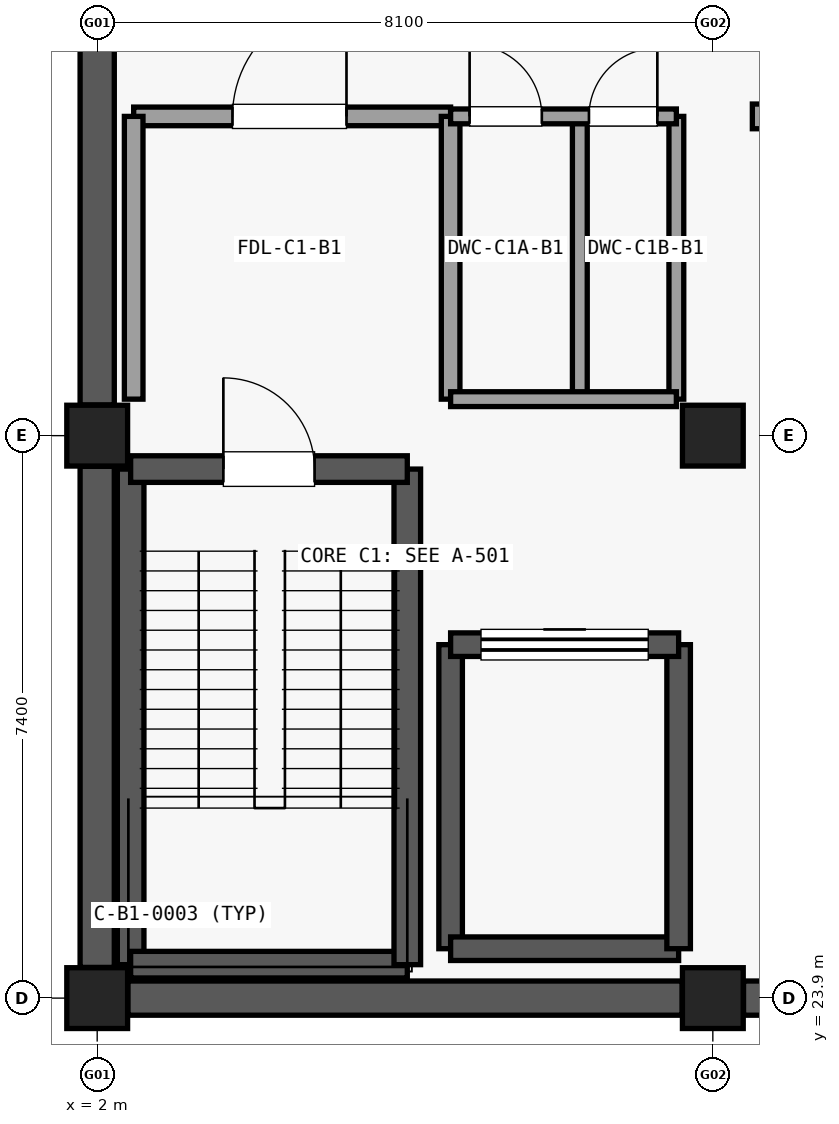
"""IFC4 building model, lengths in metres.
Left out: names, types, materials, properties, quantities, classifications, styles, units other than length and angle.
Written with IfcOpenShell. Run it as: python <this file> out.ifc"""

import sys

from ifc_helpers import new_model, si_unit, direction, frame, frame_2d, origin, origin_2d, place, context, subcontext, project, spatial, rectangle, extrude, element, fill, save


model = new_model("IFC4")
c1 = context("Model", 3, precision=1e-05, world=origin(), true_north=direction((0.0, 1.0)))
c2 = subcontext(c1, "Body", "Model", "MODEL_VIEW")
j1 = project(units=[si_unit("LENGTHUNIT", "METRE"), si_unit("PLANEANGLEUNIT", "RADIAN")], contexts=[c1])
p1 = place(None, origin())
s1 = spatial("IfcSite", under=j1, at=p1, CompositionType="ELEMENT")
p2 = place(p1, origin())
s2 = spatial("IfcBuilding", under=s1, at=p2, CompositionType="ELEMENT")
p3 = place(p2, frame((0.0, 0.0, -4.8)))
s3 = spatial("IfcBuildingStorey", under=s2, at=p3, CompositionType="ELEMENT", Elevation=-4.8)
for number, where, z_axis, x_axis in (
    (1, (2.0, 23.9, 0.0), (0.0, 0.0, 1.0), (1.0, 0.0, 0.0)),
    (2, (2.0, 31.3, 0.0), (0.0, 0.0, 1.0), (1.0, 0.0, 0.0)),
    (3, (10.1, 23.9, 0.0), (0.0, 0.0, 1.0), (1.0, 0.0, 0.0)),
    (4, (10.1, 31.3, 0.0), (0.0, 0.0, 1.0), (1.0, 0.0, 0.0)),
):
    element("IfcColumn", number, at=place(p3, frame(where, z_axis=z_axis, x_axis=x_axis)), inside=s3, PredefinedType="COLUMN", context=c2, shape_type="SweptSolid", body=[
        extrude(rectangle(XDim=0.8, YDim=0.8, at=origin_2d()), origin(), (0.0, 0.0, 1.0), 4.52),
    ])
p4 = place(p3, frame((9.696, 23.9, 0.0), z_axis=(0.0, 0.0, 1.0), x_axis=(-1.0, 0.0, 0.0)))
e5 = element("IfcWall", 5, at=p4, inside=s3, PredefinedType="USERDEFINED", context=c2, shape_type="SweptSolid", body=[
    extrude(rectangle(XDim=7.292, YDim=0.45, at=frame_2d((3.646, 0.0))), origin(), (0.0, 0.0, 1.0), 2.95),
])
p5 = place(p3, frame((2.0, 24.304, 0.0), z_axis=(0.0, 0.0, 1.0), x_axis=(0.0, 1.0, 0.0)))
e6 = element("IfcWall", 6, at=p5, inside=s3, PredefinedType="USERDEFINED", context=c2, shape_type="SweptSolid", body=[
    extrude(rectangle(XDim=6.592, YDim=0.45, at=frame_2d((3.296, 0.0))), origin(), (0.0, 0.0, 1.0), 2.95),
])
p6 = place(p3, frame((2.0, 31.704, 0.0), z_axis=(0.0, 0.0, 1.0), x_axis=(0.0, 1.0, 0.0)))
e7 = element("IfcWall", 7, at=p6, inside=s3, PredefinedType="USERDEFINED", context=c2, shape_type="SweptSolid", body=[
    extrude(rectangle(XDim=6.592, YDim=0.45, at=frame_2d((3.296, 0.0))), origin(), (0.0, 0.0, 1.0), 2.95),
])
p7 = place(p3, frame((17.796, 23.9, 0.0), z_axis=(0.0, 0.0, 1.0), x_axis=(-1.0, 0.0, 0.0)))
e8 = element("IfcWall", 8, at=p7, inside=s3, PredefinedType="USERDEFINED", context=c2, shape_type="SweptSolid", body=[
    extrude(rectangle(XDim=7.292, YDim=0.45, at=frame_2d((3.646, 0.0))), origin(), (0.0, 0.0, 1.0), 2.95),
])
p8 = place(p3, frame((2.44, 24.34, 0.0), z_axis=(0.0, 0.0, 1.0), x_axis=(0.0, 1.0, 0.0)))
e9 = element("IfcWall", 9, at=p8, inside=s3, PredefinedType="SHEAR", context=c2, shape_type="SweptSolid", body=[
    extrude(rectangle(XDim=6.52, YDim=0.35, at=frame_2d((3.26, 0.0))), origin(), (0.0, 0.0, 1.0), 4.515),
])
p9 = place(p3, frame((2.44, 24.34, 0.0), z_axis=(0.0, 0.0, 1.0), x_axis=(1.0, 0.0, 0.0)))
e10 = element("IfcWall", 10, at=p9, inside=s3, PredefinedType="SHEAR", context=c2, shape_type="SweptSolid", body=[
    extrude(rectangle(XDim=3.64, YDim=0.35, at=frame_2d((1.82, 0.0))), origin(), (0.0, 0.0, 1.0), 4.515),
])
p10 = place(p3, frame((6.08, 24.34, 0.0), z_axis=(0.0, 0.0, 1.0), x_axis=(0.0, 1.0, 0.0)))
e11 = element("IfcWall", 11, at=p10, inside=s3, PredefinedType="SHEAR", context=c2, shape_type="SweptSolid", body=[
    extrude(rectangle(XDim=6.52, YDim=0.35, at=frame_2d((3.26, 0.0))), origin(), (0.0, 0.0, 1.0), 4.515),
])
p11 = place(p3, frame((2.44, 30.86, 0.0), z_axis=(0.0, 0.0, 1.0), x_axis=(1.0, 0.0, 0.0)))
e12 = element("IfcWall", 12, at=p11, inside=s3, PredefinedType="SHEAR", context=c2, shape_type="SweptSolid", body=[
    extrude(rectangle(XDim=3.64, YDim=0.35, at=frame_2d((1.82, 0.0))), origin(), (0.0, 0.0, 1.0), 4.515),
])
p12 = place(p11, frame((1.22, 0.0, 0.0)))
e13 = element("IfcOpeningElement", 13, at=p12, cuts=e12, PredefinedType="OPENING", context=c2, shape_type="SweptSolid", body=[
    extrude(rectangle(XDim=1.2, YDim=2.15, at=frame_2d((0.6, 1.075))), frame((0.0, 0.185, 0.0), z_axis=(0.0, -1.0, 0.0), x_axis=(1.0, 0.0, 0.0)), (0.0, 0.0, 1.0), 0.37),
])
p13 = place(p3, frame((6.65, 24.55, 0.0), z_axis=(0.0, 0.0, 1.0), x_axis=(0.0, 1.0, 0.0)))
e14 = element("IfcWall", 14, at=p13, inside=s3, PredefinedType="SHEAR", context=c2, shape_type="SweptSolid", body=[
    extrude(rectangle(XDim=4.0, YDim=0.31, at=frame_2d((2.0, 0.0))), origin(), (0.0, 0.0, 1.0), 4.515),
])
p14 = place(p3, frame((6.65, 24.55, 0.0), z_axis=(0.0, 0.0, 1.0), x_axis=(1.0, 0.0, 0.0)))
e15 = element("IfcWall", 15, at=p14, inside=s3, PredefinedType="SHEAR", context=c2, shape_type="SweptSolid", body=[
    extrude(rectangle(XDim=3.0, YDim=0.31, at=frame_2d((1.5, 0.0))), origin(), (0.0, 0.0, 1.0), 4.515),
])
p15 = place(p3, frame((9.65, 24.55, 0.0), z_axis=(0.0, 0.0, 1.0), x_axis=(0.0, 1.0, 0.0)))
e16 = element("IfcWall", 16, at=p15, inside=s3, PredefinedType="SHEAR", context=c2, shape_type="SweptSolid", body=[
    extrude(rectangle(XDim=4.0, YDim=0.31, at=frame_2d((2.0, 0.0))), origin(), (0.0, 0.0, 1.0), 4.515),
])
p16 = place(p3, frame((6.65, 28.55, 0.0), z_axis=(0.0, 0.0, 1.0), x_axis=(1.0, 0.0, 0.0)))
e17 = element("IfcWall", 17, at=p16, inside=s3, PredefinedType="SHEAR", context=c2, shape_type="SweptSolid", body=[
    extrude(rectangle(XDim=3.0, YDim=0.31, at=frame_2d((1.5, 0.0))), origin(), (0.0, 0.0, 1.0), 4.515),
])
p17 = place(p16, frame((0.4, 0.0, 0.0)))
e18 = element("IfcOpeningElement", 18, at=p17, cuts=e17, PredefinedType="OPENING", context=c2, shape_type="SweptSolid", body=[
    extrude(rectangle(XDim=2.2, YDim=2.55, at=frame_2d((1.1, 1.275))), frame((0.0, 0.165, 0.0), z_axis=(0.0, -1.0, 0.0), x_axis=(1.0, 0.0, 0.0)), (0.0, 0.0, 1.0), 0.33),
])
p18 = place(p3, frame((2.48, 35.5, 0.0), z_axis=(0.0, 0.0, 1.0), x_axis=(1.0, 0.0, 0.0)))
e19 = element("IfcWall", 19, at=p18, inside=s3, PredefinedType="PARTITIONING", context=c2, shape_type="SweptSolid", body=[
    extrude(rectangle(XDim=4.17, YDim=0.245, at=frame_2d((2.085, 0.0))), origin(), (0.0, 0.0, 1.0), 3.66),
])
p19 = place(p18, frame((1.3, 0.0, 0.0)))
e20 = element("IfcOpeningElement", 20, at=p19, cuts=e19, PredefinedType="OPENING", context=c2, shape_type="SweptSolid", body=[
    extrude(rectangle(XDim=1.5, YDim=2.15, at=frame_2d((0.75, 1.075))), frame((0.0, 0.133, 0.0), z_axis=(0.0, -1.0, 0.0), x_axis=(1.0, 0.0, 0.0)), (0.0, 0.0, 1.0), 0.265),
])
for number, where, z_axis, x_axis in (
    (21, (2.48, 31.78, 0.0), (0.0, 0.0, 1.0), (0.0, 1.0, 0.0)),
    (22, (6.65, 31.78, 0.0), (0.0, 0.0, 1.0), (0.0, 1.0, 0.0)),
):
    element("IfcWall", number, at=place(p3, frame(where, z_axis=z_axis, x_axis=x_axis)), inside=s3, PredefinedType="PARTITIONING", context=c2, shape_type="SweptSolid", body=[
        extrude(rectangle(XDim=3.72, YDim=0.245, at=frame_2d((1.86, 0.0))), origin(), (0.0, 0.0, 1.0), 3.66),
    ])
for number, where, z_axis, x_axis in (
    (23, (8.35, 31.78, 0.0), (0.0, 0.0, 1.0), (0.0, 1.0, 0.0)),
    (24, (9.62, 31.78, 0.0), (0.0, 0.0, 1.0), (0.0, 1.0, 0.0)),
):
    element("IfcWall", number, at=place(p3, frame(where, z_axis=z_axis, x_axis=x_axis)), inside=s3, PredefinedType="PARTITIONING", context=c2, shape_type="SweptSolid", body=[
        extrude(rectangle(XDim=3.72, YDim=0.195, at=frame_2d((1.86, 0.0))), origin(), (0.0, 0.0, 1.0), 3.66),
    ])
p20 = place(p3, frame((6.65, 31.78, 0.0), z_axis=(0.0, 0.0, 1.0), x_axis=(1.0, 0.0, 0.0)))
e25 = element("IfcWall", 25, at=p20, inside=s3, PredefinedType="PARTITIONING", context=c2, shape_type="SweptSolid", body=[
    extrude(rectangle(XDim=2.97, YDim=0.195, at=frame_2d((1.485, 0.0))), origin(), (0.0, 0.0, 1.0), 3.66),
])
p21 = place(p3, frame((6.65, 35.5, 0.0), z_axis=(0.0, 0.0, 1.0), x_axis=(1.0, 0.0, 0.0)))
e26 = element("IfcWall", 26, at=p21, inside=s3, PredefinedType="PARTITIONING", context=c2, shape_type="SweptSolid", body=[
    extrude(rectangle(XDim=2.97, YDim=0.195, at=frame_2d((1.485, 0.0))), origin(), (0.0, 0.0, 1.0), 3.66),
])
p22 = place(p21, frame((0.25, 0.0, 0.0)))
e27 = element("IfcOpeningElement", 27, at=p22, cuts=e26, PredefinedType="OPENING", context=c2, shape_type="SweptSolid", body=[
    extrude(rectangle(XDim=0.95, YDim=2.1, at=frame_2d((0.475, 1.05))), frame((0.0, 0.107, 0.0), z_axis=(0.0, -1.0, 0.0), x_axis=(1.0, 0.0, 0.0)), (0.0, 0.0, 1.0), 0.215),
])
p23 = place(p21, frame((1.82, 0.0, 0.0)))
e28 = element("IfcOpeningElement", 28, at=p23, cuts=e26, PredefinedType="OPENING", context=c2, shape_type="SweptSolid", body=[
    extrude(rectangle(XDim=0.9, YDim=2.1, at=frame_2d((0.45, 1.05))), frame((0.0, 0.107, 0.0), z_axis=(0.0, -1.0, 0.0), x_axis=(1.0, 0.0, 0.0)), (0.0, 0.0, 1.0), 0.215),
])
p24 = place(p3, frame((10.62, 35.5, 0.0), z_axis=(0.0, 0.0, 1.0), x_axis=(1.0, 0.0, 0.0)))
e29 = element("IfcWall", 29, at=p24, inside=s3, PredefinedType="SHEAR", context=c2, shape_type="SweptSolid", body=[
    extrude(rectangle(XDim=7.06, YDim=0.325, at=frame_2d((3.53, 0.0))), origin(), (0.0, 0.0, 1.0), 3.66),
])
p25 = place(p24, frame((2.43, 0.0, 0.0)))
e30 = element("IfcOpeningElement", 30, at=p25, cuts=e29, PredefinedType="OPENING", context=c2, shape_type="SweptSolid", body=[
    extrude(rectangle(XDim=2.2, YDim=2.65, at=frame_2d((1.1, 1.325))), frame((0.0, 0.172, 0.0), z_axis=(0.0, -1.0, 0.0), x_axis=(1.0, 0.0, 0.0)), (0.0, 0.0, 1.0), 0.345),
])
p26 = place(p12, origin())
e31 = element("IfcDoor", 31, at=p26, inside=s3, OperationType="SINGLE_SWING_LEFT", PredefinedType="DOOR", context=c2, shape_type="SweptSolid", body=[
    extrude(rectangle(XDim=1.2, YDim=2.15, at=frame_2d((0.6, 1.075))), frame((0.0, 0.025, 0.0), z_axis=(0.0, -1.0, 0.0), x_axis=(1.0, 0.0, 0.0)), (0.0, 0.0, 1.0), 0.05),
])
fill(e13, e31)
p27 = place(p17, origin())
e32 = element("IfcDoor", 32, at=p27, inside=s3, OperationType="SLIDING_TO_LEFT", PredefinedType="DOOR", context=c2, shape_type="SweptSolid", body=[
    extrude(rectangle(XDim=2.2, YDim=2.55, at=frame_2d((1.1, 1.275))), frame((0.0, 0.025, 0.0), z_axis=(0.0, -1.0, 0.0), x_axis=(1.0, 0.0, 0.0)), (0.0, 0.0, 1.0), 0.05),
])
fill(e18, e32)
p28 = place(p19, origin())
e33 = element("IfcDoor", 33, at=p28, inside=s3, OperationType="SINGLE_SWING_RIGHT", PredefinedType="DOOR", context=c2, shape_type="SweptSolid", body=[
    extrude(rectangle(XDim=1.5, YDim=2.15, at=frame_2d((0.75, 1.075))), frame((0.0, 0.025, 0.0), z_axis=(0.0, -1.0, 0.0), x_axis=(1.0, 0.0, 0.0)), (0.0, 0.0, 1.0), 0.05),
])
fill(e20, e33)
p29 = place(p22, origin())
e34 = element("IfcDoor", 34, at=p29, inside=s3, OperationType="SINGLE_SWING_LEFT", PredefinedType="DOOR", context=c2, shape_type="SweptSolid", body=[
    extrude(rectangle(XDim=0.95, YDim=2.1, at=frame_2d((0.475, 1.05))), frame((0.0, 0.025, 0.0), z_axis=(0.0, -1.0, 0.0), x_axis=(1.0, 0.0, 0.0)), (0.0, 0.0, 1.0), 0.05),
])
fill(e27, e34)
p30 = place(p23, origin())
e35 = element("IfcDoor", 35, at=p30, inside=s3, OperationType="SINGLE_SWING_RIGHT", PredefinedType="DOOR", context=c2, shape_type="SweptSolid", body=[
    extrude(rectangle(XDim=0.9, YDim=2.1, at=frame_2d((0.45, 1.05))), frame((0.0, 0.025, 0.0), z_axis=(0.0, -1.0, 0.0), x_axis=(1.0, 0.0, 0.0)), (0.0, 0.0, 1.0), 0.05),
])
fill(e28, e35)
save(model, sys.argv[1])
